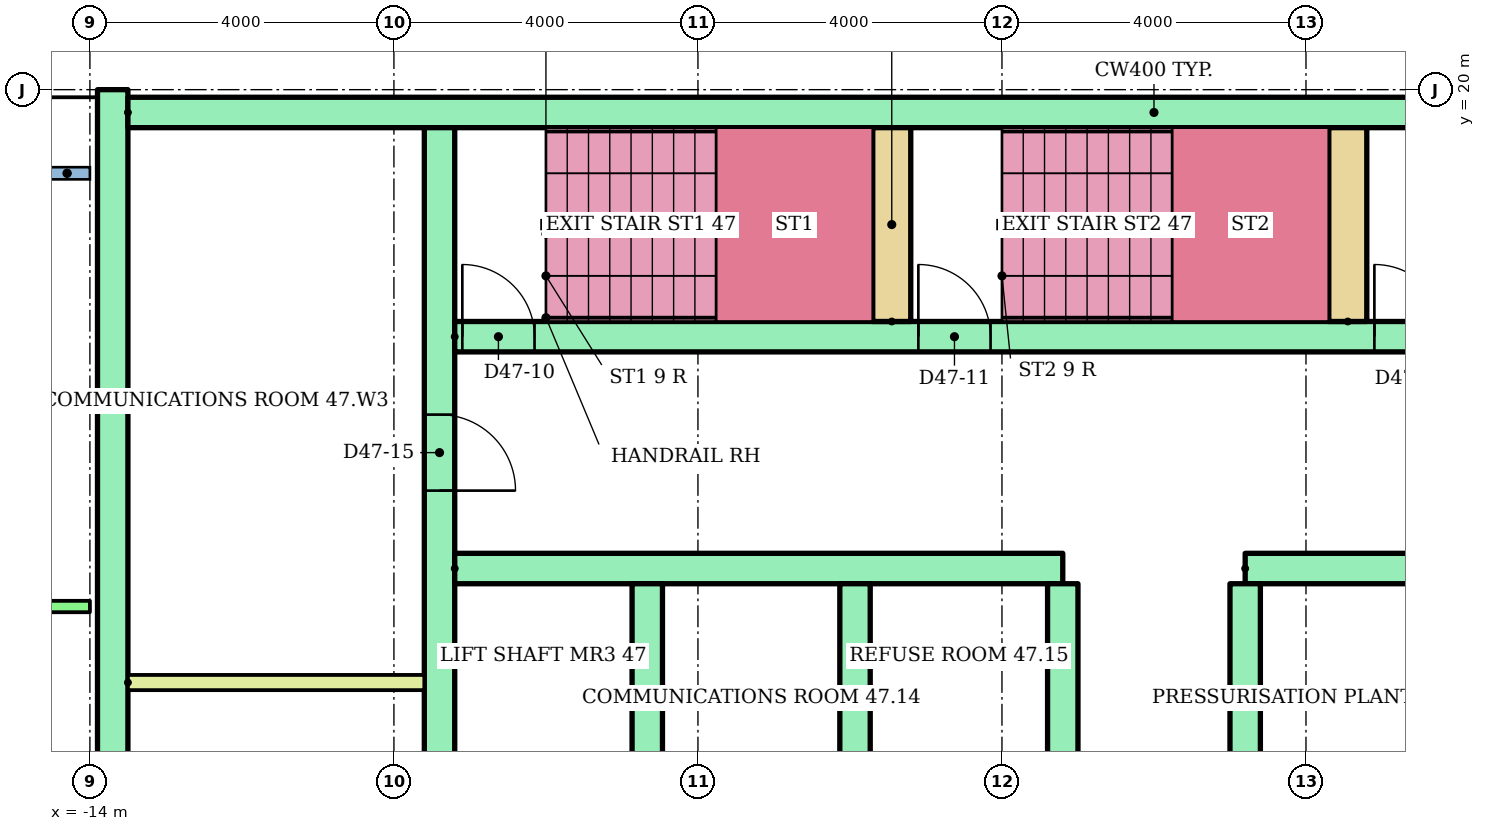
"""IFC4 building model, lengths in metres.
Left out: names, types, materials, properties, quantities, classifications, styles, units other than length and angle.
Written with IfcOpenShell. Run it as: python <this file> out.ifc"""

import sys

from ifc_helpers import new_model, si_unit, direction, frame, frame_2d, origin, place, context, subcontext, project, spatial, rectangle, extrude, element, fill, save


model = new_model("IFC4")
c1 = context("Model", 3, precision=1e-05, world=origin(), true_north=direction((0.0, 1.0)))
c2 = subcontext(c1, "Body", "Model", "MODEL_VIEW")
j1 = project(units=[si_unit("LENGTHUNIT", "METRE"), si_unit("PLANEANGLEUNIT", "RADIAN")], contexts=[c1])
p1 = place(None, origin())
s1 = spatial("IfcSite", under=j1, at=p1, CompositionType="ELEMENT")
p2 = place(p1, origin())
s2 = spatial("IfcBuilding", under=s1, at=p2, CompositionType="ELEMENT")
p3 = place(p2, frame((0.0, 0.0, 181.3)))
s3 = spatial("IfcBuildingStorey", under=s2, at=p3, CompositionType="ELEMENT", Elevation=181.3)
p4 = place(p3, frame((-13.7, 3.0, 0.0), z_axis=(0.0, 0.0, 1.0), x_axis=(0.0, 1.0, 0.0)))
e1 = element("IfcWall", 1, at=p4, inside=s3, PredefinedType="SHEAR", context=c2, shape_type="SweptSolid", body=[
    extrude(rectangle(XDim=17.0, YDim=0.4, at=frame_2d((8.5, 0.0))), origin(), (0.0, 0.0, 1.0), 2.92),
])
p5 = place(p3, frame((-13.5, 19.7, 0.0)))
e2 = element("IfcWall", 2, at=p5, inside=s3, PredefinedType="SHEAR", context=c2, shape_type="SweptSolid", body=[
    extrude(rectangle(XDim=27.0, YDim=0.4, at=frame_2d((13.5, 0.0))), origin(), (0.0, 0.0, 1.0), 2.92),
])
p6 = place(p3, frame((-9.4, 6.8, 0.0), z_axis=(0.0, 0.0, 1.0), x_axis=(0.0, 1.0, 0.0)))
e3 = element("IfcWall", 3, at=p6, inside=s3, PredefinedType="SHEAR", context=c2, shape_type="SweptSolid", body=[
    extrude(rectangle(XDim=12.7, YDim=0.4, at=frame_2d((6.35, 0.0))), origin(), (0.0, 0.0, 1.0), 2.92),
])
p7 = place(p6, frame((0.3, 0.0, 0.0)))
e4 = element("IfcOpeningElement", 4, at=p7, cuts=e3, PredefinedType="OPENING", context=c2, shape_type="SweptSolid", body=[
    extrude(rectangle(XDim=1.0, YDim=2.1, at=frame_2d((0.5, 1.05))), frame((0.0, 0.21, 0.0), z_axis=(0.0, -1.0, 0.0), x_axis=(1.0, 0.0, 0.0)), (0.0, 0.0, 1.0), 0.42),
])
p8 = place(p6, frame((2.05, 0.0, 0.0)))
e5 = element("IfcOpeningElement", 5, at=p8, cuts=e3, PredefinedType="OPENING", context=c2, shape_type="SweptSolid", body=[
    extrude(rectangle(XDim=1.0, YDim=2.1, at=frame_2d((0.5, 1.05))), frame((0.0, 0.21, 0.0), z_axis=(0.0, -1.0, 0.0), x_axis=(1.0, 0.0, 0.0)), (0.0, 0.0, 1.0), 0.42),
])
p9 = place(p6, frame((7.925, 0.0, 0.0)))
e6 = element("IfcOpeningElement", 6, at=p9, cuts=e3, PredefinedType="OPENING", context=c2, shape_type="SweptSolid", body=[
    extrude(rectangle(XDim=1.0, YDim=2.1, at=frame_2d((0.5, 1.05))), frame((0.0, 0.21, 0.0), z_axis=(0.0, -1.0, 0.0), x_axis=(1.0, 0.0, 0.0)), (0.0, 0.0, 1.0), 0.42),
])
for number, where in (
    (7, (-9.2, 13.7, 0.0)),
    (8, (1.2, 13.7, 0.0)),
):
    element("IfcWall", number, at=place(p3, frame(where)), inside=s3, PredefinedType="SHEAR", context=c2, shape_type="SweptSolid", body=[
        extrude(rectangle(XDim=8.0, YDim=0.4, at=frame_2d((4.0, 0.0))), origin(), (0.0, 0.0, 1.0), 2.92),
    ])
for number, where, z_axis, x_axis in (
    (9, (-6.667, 10.5, 0.0), (0.0, 0.0, 1.0), (0.0, 1.0, 0.0)),
    (10, (-3.933, 10.5, 0.0), (0.0, 0.0, 1.0), (0.0, 1.0, 0.0)),
    (11, (-1.2, 10.5, 0.0), (0.0, 0.0, 1.0), (0.0, 1.0, 0.0)),
    (12, (1.2, 10.5, 0.0), (0.0, 0.0, 1.0), (0.0, 1.0, 0.0)),
):
    element("IfcWall", number, at=place(p3, frame(where, z_axis=z_axis, x_axis=x_axis)), inside=s3, PredefinedType="SHEAR", context=c2, shape_type="SweptSolid", body=[
        extrude(rectangle(XDim=3.0, YDim=0.4, at=frame_2d((1.5, 0.0))), origin(), (0.0, 0.0, 1.0), 2.92),
    ])
p10 = place(p3, frame((-9.2, 16.75, 0.0)))
e13 = element("IfcWall", 13, at=p10, inside=s3, PredefinedType="SHEAR", context=c2, shape_type="SweptSolid", body=[
    extrude(rectangle(XDim=18.4, YDim=0.4, at=frame_2d((9.2, 0.0))), origin(), (0.0, 0.0, 1.0), 2.92),
])
p11 = place(p10, frame((0.1, 0.0, 0.0)))
e14 = element("IfcOpeningElement", 14, at=p11, cuts=e13, PredefinedType="OPENING", context=c2, shape_type="SweptSolid", body=[
    extrude(rectangle(XDim=0.95, YDim=2.1, at=frame_2d((0.475, 1.05))), frame((0.0, 0.21, 0.0), z_axis=(0.0, -1.0, 0.0), x_axis=(1.0, 0.0, 0.0)), (0.0, 0.0, 1.0), 0.42),
])
p12 = place(p10, frame((6.1, 0.0, 0.0)))
e15 = element("IfcOpeningElement", 15, at=p12, cuts=e13, PredefinedType="OPENING", context=c2, shape_type="SweptSolid", body=[
    extrude(rectangle(XDim=0.95, YDim=2.1, at=frame_2d((0.475, 1.05))), frame((0.0, 0.21, 0.0), z_axis=(0.0, -1.0, 0.0), x_axis=(1.0, 0.0, 0.0)), (0.0, 0.0, 1.0), 0.42),
])
p13 = place(p10, frame((12.1, 0.0, 0.0)))
e16 = element("IfcOpeningElement", 16, at=p13, cuts=e13, PredefinedType="OPENING", context=c2, shape_type="SweptSolid", body=[
    extrude(rectangle(XDim=0.95, YDim=2.1, at=frame_2d((0.475, 1.05))), frame((0.0, 0.21, 0.0), z_axis=(0.0, -1.0, 0.0), x_axis=(1.0, 0.0, 0.0)), (0.0, 0.0, 1.0), 0.42),
])
for number, where, z_axis, x_axis in (
    (17, (-3.45, 16.95, 0.0), (0.0, 0.0, 1.0), (0.0, 1.0, 0.0)),
    (18, (2.55, 16.95, 0.0), (0.0, 0.0, 1.0), (0.0, 1.0, 0.0)),
):
    element("IfcWall", number, at=place(p3, frame(where, z_axis=z_axis, x_axis=x_axis)), inside=s3, PredefinedType="SHEAR", context=c2, shape_type="SweptSolid", body=[
        extrude(rectangle(XDim=2.55, YDim=0.5, at=frame_2d((1.275, 0.0))), origin(), (0.0, 0.0, 1.0), 2.92),
    ])
p14 = place(p3, frame((-13.5, 12.2, 0.0)))
e19 = element("IfcWall", 19, at=p14, inside=s3, PredefinedType="PARTITIONING", context=c2, shape_type="SweptSolid", body=[
    extrude(rectangle(XDim=3.9, YDim=0.2, at=frame_2d((1.95, 0.0))), origin(), (0.0, 0.0, 1.0), 2.92),
])
p15 = place(p3, frame((-24.82, 13.2, 0.0)))
e20 = element("IfcWall", 20, at=p15, inside=s3, PredefinedType="PARTITIONING", context=c2, shape_type="SweptSolid", body=[
    extrude(rectangle(XDim=10.82, YDim=0.15, at=frame_2d((5.41, 0.0))), origin(), (0.0, 0.0, 1.0), 2.4),
])
p16 = place(p15, frame((1.97, 0.0, 0.0)))
e21 = element("IfcOpeningElement", 21, at=p16, cuts=e20, PredefinedType="OPENING", context=c2, shape_type="SweptSolid", body=[
    extrude(rectangle(XDim=1.0, YDim=2.1, at=frame_2d((0.5, 1.05))), frame((0.0, 0.085, 0.0), z_axis=(0.0, -1.0, 0.0), x_axis=(1.0, 0.0, 0.0)), (0.0, 0.0, 1.0), 0.17),
])
p17 = place(p15, frame((7.27, 0.0, 0.0)))
e22 = element("IfcOpeningElement", 22, at=p17, cuts=e20, PredefinedType="OPENING", context=c2, shape_type="SweptSolid", body=[
    extrude(rectangle(XDim=1.0, YDim=2.1, at=frame_2d((0.5, 1.05))), frame((0.0, 0.085, 0.0), z_axis=(0.0, -1.0, 0.0), x_axis=(1.0, 0.0, 0.0)), (0.0, 0.0, 1.0), 0.17),
])
p18 = place(p11, origin())
e23 = element("IfcDoor", 23, at=p18, inside=s3, OperationType="SINGLE_SWING_LEFT", PredefinedType="DOOR", context=c2, shape_type="SweptSolid", body=[
    extrude(rectangle(XDim=0.95, YDim=2.1, at=frame_2d((0.475, 1.05))), frame((0.0, 0.025, 0.0), z_axis=(0.0, -1.0, 0.0), x_axis=(1.0, 0.0, 0.0)), (0.0, 0.0, 1.0), 0.05),
])
fill(e14, e23)
p19 = place(p12, origin())
e24 = element("IfcDoor", 24, at=p19, inside=s3, OperationType="SINGLE_SWING_LEFT", PredefinedType="DOOR", context=c2, shape_type="SweptSolid", body=[
    extrude(rectangle(XDim=0.95, YDim=2.1, at=frame_2d((0.475, 1.05))), frame((0.0, 0.025, 0.0), z_axis=(0.0, -1.0, 0.0), x_axis=(1.0, 0.0, 0.0)), (0.0, 0.0, 1.0), 0.05),
])
fill(e15, e24)
p20 = place(p13, origin())
e25 = element("IfcDoor", 25, at=p20, inside=s3, OperationType="SINGLE_SWING_LEFT", PredefinedType="DOOR", context=c2, shape_type="SweptSolid", body=[
    extrude(rectangle(XDim=0.95, YDim=2.1, at=frame_2d((0.475, 1.05))), frame((0.0, 0.025, 0.0), z_axis=(0.0, -1.0, 0.0), x_axis=(1.0, 0.0, 0.0)), (0.0, 0.0, 1.0), 0.05),
])
fill(e16, e25)
p21 = place(p9, frame((1.0, 0.0, 0.0), z_axis=(0.0, 0.0, 1.0), x_axis=(-1.0, 0.0, 0.0)))
e26 = element("IfcDoor", 26, at=p21, inside=s3, OperationType="SINGLE_SWING_LEFT", PredefinedType="DOOR", context=c2, shape_type="SweptSolid", body=[
    extrude(rectangle(XDim=1.0, YDim=2.1, at=frame_2d((0.5, 1.05))), frame((0.0, 0.025, 0.0), z_axis=(0.0, -1.0, 0.0), x_axis=(1.0, 0.0, 0.0)), (0.0, 0.0, 1.0), 0.05),
])
fill(e6, e26)
save(model, sys.argv[1])
